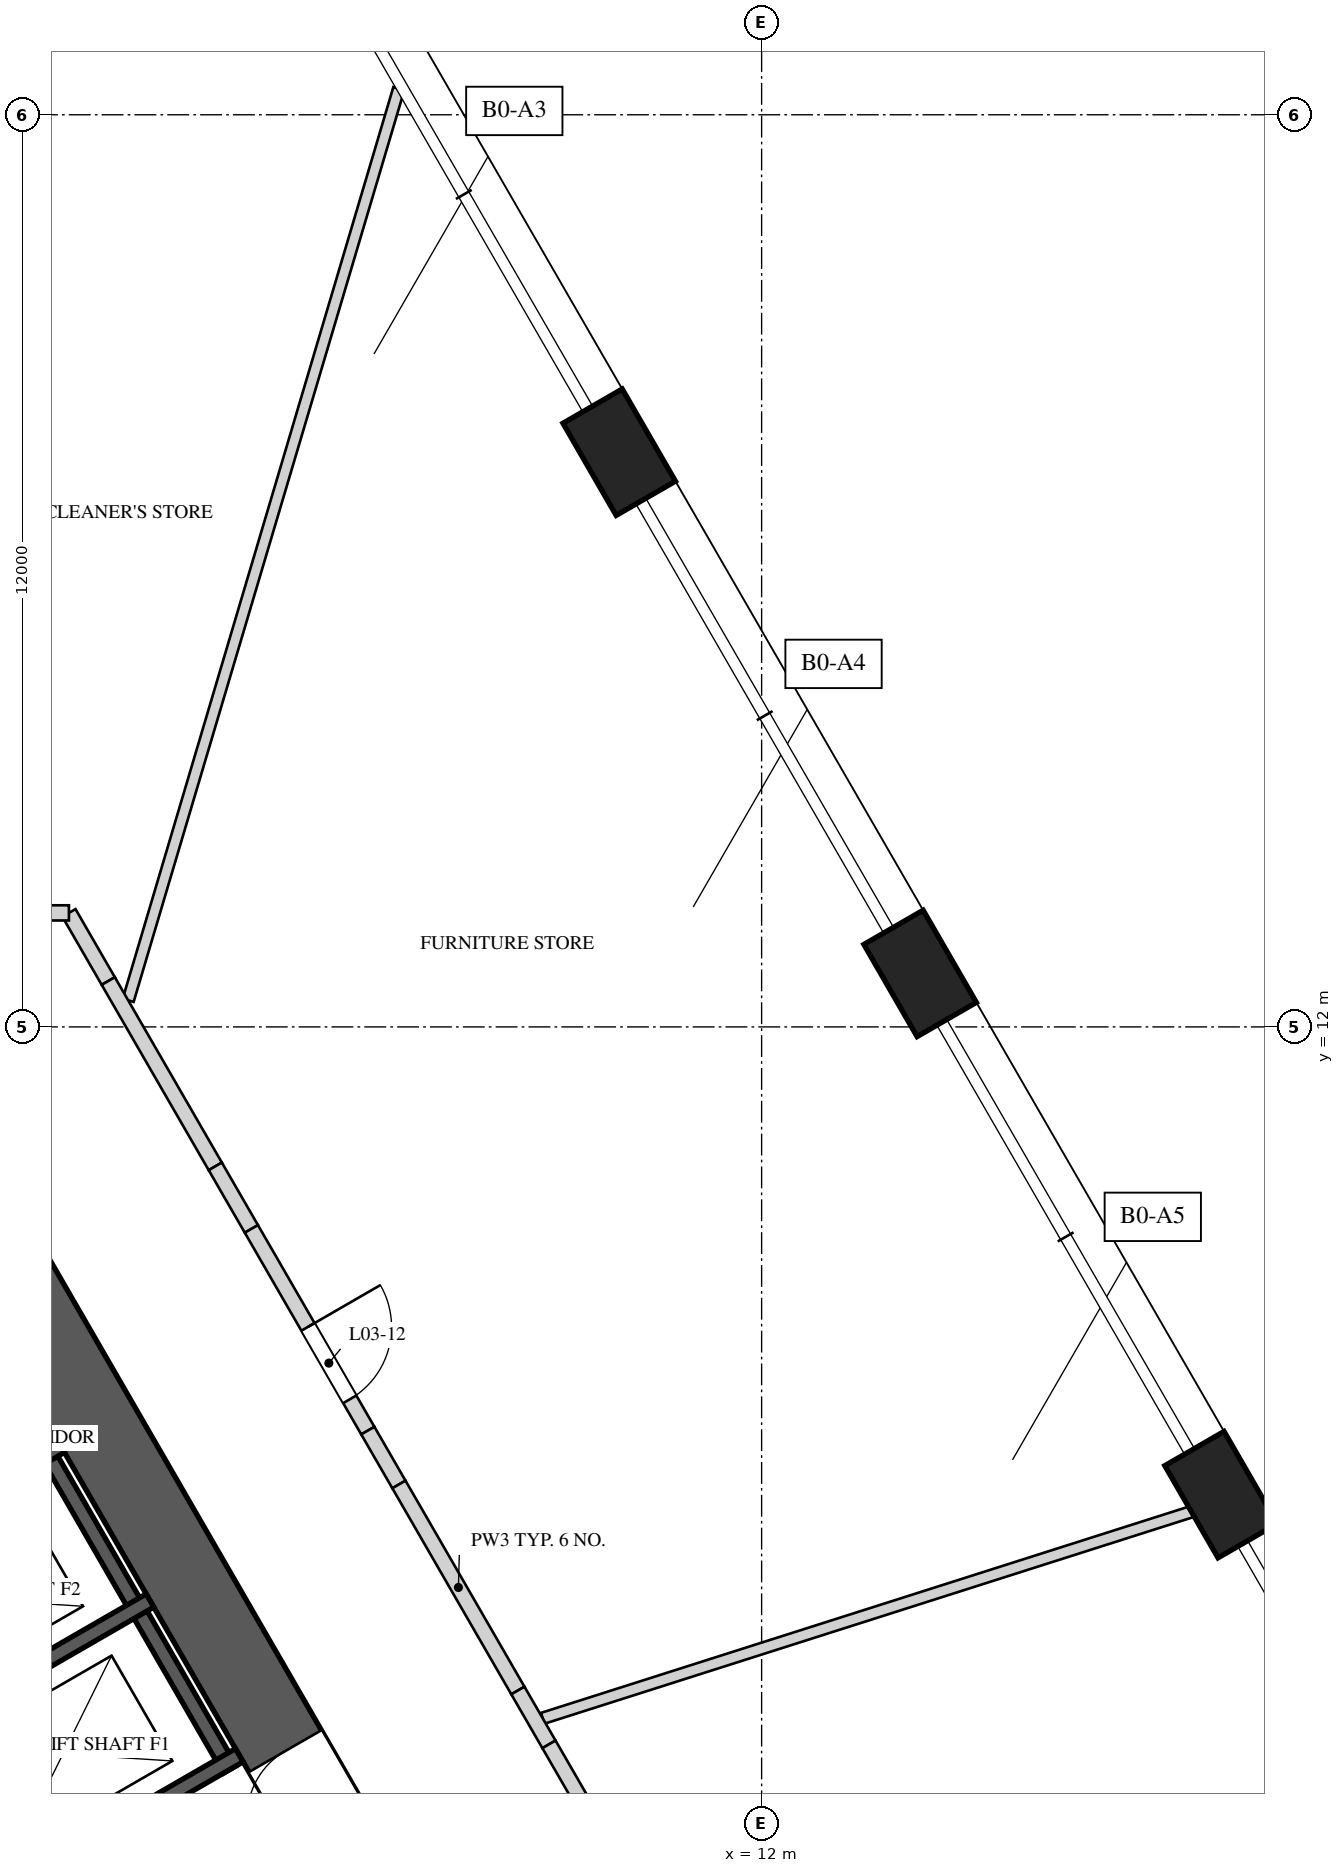
"""IFC4 building model, lengths in metres.
Left out: names, types, materials, properties, quantities, classifications, styles, units other than length and angle.
Written with IfcOpenShell. Run it as: python <this file> out.ifc"""

import sys

from ifc_helpers import new_model, si_unit, direction, frame, frame_2d, origin, origin_2d, place, context, subcontext, project, spatial, polyline, rectangle, outline, extrude, element, fill, save


model = new_model("IFC4")
c1 = context("Model", 3, precision=1e-05, world=origin(), true_north=direction((0.0, 1.0)))
c2 = subcontext(c1, "Body", "Model", "MODEL_VIEW")
j1 = project(units=[si_unit("LENGTHUNIT", "METRE"), si_unit("PLANEANGLEUNIT", "RADIAN")], contexts=[c1])
p1 = place(None, origin())
s1 = spatial("IfcSite", under=j1, at=p1, CompositionType="ELEMENT")
p2 = place(p1, origin())
s2 = spatial("IfcBuilding", under=s1, at=p2, CompositionType="ELEMENT")
p3 = place(p2, frame((0.0, 0.0, 20.0)))
s3 = spatial("IfcBuildingStorey", under=s2, at=p3, CompositionType="ELEMENT", Elevation=20.0)
p4 = place(p3, frame((9.613, -4.25, 0.0), z_axis=(0.0, 0.0, 1.0), x_axis=(-0.500001757713, 0.866024388966, 0.0)))
e1 = element("IfcWall", 1, at=p4, inside=s3, PredefinedType="SHEAR", context=c2, shape_type="SweptSolid", body=[
    extrude(rectangle(XDim=16.974, YDim=1.1, at=frame_2d((8.487, 0.0))), origin(), (0.0, 0.0, 1.0), 5.0),
])
p5 = place(p4, frame((6.762, 0.0, 0.0)))
e2 = element("IfcOpeningElement", 2, at=p5, cuts=e1, PredefinedType="OPENING", context=c2, shape_type="SweptSolid", body=[
    extrude(rectangle(XDim=1.0, YDim=2.4, at=frame_2d((0.5, 1.2))), frame((0.0, 0.56, 0.0), z_axis=(0.0, -1.0, 0.0), x_axis=(1.0, 0.0, 0.0)), (0.0, 0.0, 1.0), 1.12),
])
for number, where, z_axis, x_axis in (
    (3, (18.044, 5.846, 0.0), (0.0, 0.0, 1.0), (-0.5, 0.866, 0.0)),
    (4, (14.085, 12.704, 0.0), (0.0, 0.0, 1.0), (-0.5, 0.866, 0.0)),
    (5, (10.126, 19.561, 0.0), (0.0, 0.0, 1.0), (-0.5, 0.866, 0.0)),
):
    element("IfcColumn", number, at=place(p3, frame(where, z_axis=z_axis, x_axis=x_axis)), inside=s3, PredefinedType="COLUMN", context=c2, shape_type="SweptSolid", body=[
        extrude(rectangle(XDim=1.4, YDim=0.9, at=origin_2d()), origin(), (0.0, 0.0, 1.0), 5.0),
    ])
p6 = place(p3, frame((5.005, 2.231, 0.0), z_axis=(0.0, 0.0, 1.0), x_axis=(-0.500002801628, 0.866023786258, 0.0)))
e6 = element("IfcWall", 6, at=p6, inside=s3, PredefinedType="SOLIDWALL", context=c2, shape_type="SweptSolid", body=[
    extrude(rectangle(XDim=4.9, YDim=0.2, at=frame_2d((2.45, 0.0))), origin(), (0.0, 0.0, 1.0), 4.65),
])
p7 = place(p3, frame((2.227, 0.743, 0.0), z_axis=(0.0, 0.0, 1.0), x_axis=(0.866014461049, 0.500018952895, 0.0)))
e7 = element("IfcWall", 7, at=p7, inside=s3, PredefinedType="SOLIDWALL", context=c2, shape_type="SweptSolid", body=[
    extrude(rectangle(XDim=3.35, YDim=0.2, at=frame_2d((1.675, 0.0))), origin(), (0.0, 0.0, 1.0), 4.65),
])
p8 = place(p3, frame((1.052, 2.778, 0.0), z_axis=(0.0, 0.0, 1.0), x_axis=(0.866032680314, 0.499987396469, 0.0)))
e8 = element("IfcWall", 8, at=p8, inside=s3, PredefinedType="SOLIDWALL", context=c2, shape_type="SweptSolid", body=[
    extrude(rectangle(XDim=3.35, YDim=0.2, at=frame_2d((1.675, 0.0))), origin(), (0.0, 0.0, 1.0), 4.65),
])
p9 = place(p3, frame((-0.123, 4.813, 0.0), z_axis=(0.0, 0.0, 1.0), x_axis=(0.866014461049, 0.500018952895, 0.0)))
e9 = element("IfcWall", 9, at=p9, inside=s3, PredefinedType="SOLIDWALL", context=c2, shape_type="SweptSolid", body=[
    extrude(rectangle(XDim=3.35, YDim=0.2, at=frame_2d((1.675, 0.0))), origin(), (0.0, 0.0, 1.0), 4.65),
])
p10 = place(p3, frame((2.628, 27.737, 0.0), z_axis=(0.0, 0.0, 1.0), x_axis=(-0.094320531398, -0.995541881267, 0.0)))
e10 = element("IfcWall", 10, at=p10, inside=s3, PredefinedType="PARTITIONING", context=c2, shape_type="SweptSolid", body=[
    extrude(rectangle(XDim=8.513, YDim=0.15, at=frame_2d((4.257, 0.0))), origin(), (0.0, 0.0, 1.0), 4.65),
])
p11 = place(p3, frame((3.666, 12.35, 0.0), z_axis=(0.0, 0.0, 1.0), x_axis=(0.284585958586, 0.958650526613, 0.0)))
e11 = element("IfcWall", 11, at=p11, inside=s3, PredefinedType="PARTITIONING", context=c2, shape_type="SweptSolid", body=[
    extrude(rectangle(XDim=12.51, YDim=0.15, at=frame_2d((6.255, 0.0))), origin(), (0.0, 0.0, 1.0), 4.65),
])
p12 = place(p3, frame((9.12, 2.904, 0.0), z_axis=(0.0, 0.0, 1.0), x_axis=(0.952860213553, 0.303409646233, 0.0)))
e12 = element("IfcWall", 12, at=p12, inside=s3, PredefinedType="PARTITIONING", context=c2, shape_type="SweptSolid", body=[
    extrude(rectangle(XDim=9.295, YDim=0.15, at=frame_2d((4.647, 0.0))), origin(), (0.0, 0.0, 1.0), 3.75),
])
p13 = place(p3, frame((2.887, 13.5, 0.0), z_axis=(0.0, 0.0, 1.0), x_axis=(0.499994660107, -0.866028486751, 0.0)))
e13 = element("IfcWall", 13, at=p13, inside=s3, PredefinedType="SOLIDWALL", context=c2, shape_type="SweptSolid", body=[
    extrude(rectangle(XDim=1.035, YDim=0.2, at=frame_2d((0.518, 0.0))), origin(), (0.0, 0.0, 1.0), 3.55),
])
p14 = place(p3, frame((3.404, 12.604, 0.0), z_axis=(0.0, 0.0, 1.0), x_axis=(0.500000186108, -0.866025296335, 0.0)))
e14 = element("IfcWall", 14, at=p14, inside=s3, PredefinedType="SOLIDWALL", context=c2, shape_type="SweptSolid", body=[
    extrude(rectangle(XDim=2.815, YDim=0.2, at=frame_2d((1.408, 0.0))), origin(), (0.0, 0.0, 1.0), 4.65),
])
p15 = place(p3, frame((4.812, 10.165, 0.0), z_axis=(0.0, 0.0, 1.0), x_axis=(0.500174821557, -0.865924446982, 0.0)))
e15 = element("IfcWall", 15, at=p15, inside=s3, PredefinedType="SOLIDWALL", context=c2, shape_type="SweptSolid", body=[
    extrude(rectangle(XDim=0.95, YDim=0.2, at=frame_2d((0.475, 0.0))), origin(), (0.0, 0.0, 1.0), 3.75),
])
p16 = place(p3, frame((5.287, 9.343, 0.0), z_axis=(0.0, 0.0, 1.0), x_axis=(0.499952348839, -0.866052913447, 0.0)))
e16 = element("IfcWall", 16, at=p16, inside=s3, PredefinedType="SOLIDWALL", context=c2, shape_type="SweptSolid", body=[
    extrude(rectangle(XDim=3.064, YDim=0.2, at=frame_2d((1.532, 0.0))), origin(), (0.0, 0.0, 1.0), 4.65),
])
p17 = place(p16, frame((1.489, 0.0, 0.0)))
e17 = element("IfcOpeningElement", 17, at=p17, cuts=e16, PredefinedType="OPENING", context=c2, shape_type="SweptSolid", body=[
    extrude(rectangle(XDim=1.1, YDim=2.4, at=frame_2d((0.55, 1.2))), frame((0.0, 0.11, 0.0), z_axis=(0.0, -1.0, 0.0), x_axis=(1.0, 0.0, 0.0)), (0.0, 0.0, 1.0), 0.22),
])
p18 = place(p3, frame((6.819, 6.689, 0.0), z_axis=(0.0, 0.0, 1.0), x_axis=(0.500118501653, -0.865956976012, 0.0)))
e18 = element("IfcWall", 18, at=p18, inside=s3, PredefinedType="SOLIDWALL", context=c2, shape_type="SweptSolid", body=[
    extrude(rectangle(XDim=0.818, YDim=0.2, at=frame_2d((0.409, 0.0))), origin(), (0.0, 0.0, 1.0), 3.75),
])
p19 = place(p3, frame((7.228, 5.98, 0.0), z_axis=(0.0, 0.0, 1.0), x_axis=(0.499947505232, -0.866055709532, 0.0)))
e19 = element("IfcWall", 19, at=p19, inside=s3, PredefinedType="SOLIDWALL", context=c2, shape_type="SweptSolid", body=[
    extrude(rectangle(XDim=3.13, YDim=0.2, at=frame_2d((1.565, 0.0))), origin(), (0.0, 0.0, 1.0), 4.65),
])
p20 = place(p3, frame((8.793, 3.27, 0.0), z_axis=(0.0, 0.0, 1.0), x_axis=(0.500118501653, -0.865956976012, 0.0)))
e20 = element("IfcWall", 20, at=p20, inside=s3, PredefinedType="SOLIDWALL", context=c2, shape_type="SweptSolid", body=[
    extrude(rectangle(XDim=0.818, YDim=0.2, at=frame_2d((0.409, 0.0))), origin(), (0.0, 0.0, 1.0), 3.75),
])
p21 = place(p3, frame((9.202, 2.561, 0.0), z_axis=(0.0, 0.0, 1.0), x_axis=(0.499952348839, -0.866052913447, 0.0)))
e21 = element("IfcWall", 21, at=p21, inside=s3, PredefinedType="SOLIDWALL", context=c2, shape_type="SweptSolid", body=[
    extrude(rectangle(XDim=3.064, YDim=0.2, at=frame_2d((1.532, 0.0))), origin(), (0.0, 0.0, 1.0), 4.65),
])
p22 = place(p21, frame((1.839, 0.0, 0.0)))
e22 = element("IfcOpeningElement", 22, at=p22, cuts=e21, PredefinedType="OPENING", context=c2, shape_type="SweptSolid", body=[
    extrude(rectangle(XDim=1.1, YDim=2.4, at=frame_2d((0.55, 1.2))), frame((0.0, 0.11, 0.0), z_axis=(0.0, -1.0, 0.0), x_axis=(1.0, 0.0, 0.0)), (0.0, 0.0, 1.0), 0.22),
])
p23 = place(p3, frame((0.52, 13.5, 0.0), z_axis=(0.0, 0.0, 1.0), x_axis=(1.0, 0.0, 0.0)))
e23 = element("IfcWall", 23, at=p23, inside=s3, PredefinedType="SOLIDWALL", context=c2, shape_type="SweptSolid", body=[
    extrude(outline(polyline([(0.0, 0.0), (2.366, 0.0), (2.366, 3.55), (2.169, 3.55), (2.169, 4.65), (0.902, 4.65), (0.902, 3.55), (0.0, 3.55), (0.0, 0.0)])), frame((0.0, 0.1, 0.0), z_axis=(0.0, -1.0, 0.0), x_axis=(1.0, 0.0, 0.0)), (0.0, 0.0, 1.0), 0.2),
])
p24 = place(p23, frame((0.936, 0.0, 0.0)))
e24 = element("IfcOpeningElement", 24, at=p24, cuts=e23, PredefinedType="OPENING", context=c2, shape_type="SweptSolid", body=[
    extrude(rectangle(XDim=1.1, YDim=2.4, at=frame_2d((0.55, 1.2))), frame((0.0, 0.11, 0.0), z_axis=(0.0, -1.0, 0.0), x_axis=(1.0, 0.0, 0.0)), (0.0, 0.0, 1.0), 0.22),
])
p25 = place(p5, origin())
e25 = element("IfcDoor", 25, at=p25, inside=s3, OperationType="SINGLE_SWING_LEFT", PredefinedType="DOOR", context=c2, shape_type="SweptSolid", body=[
    extrude(rectangle(XDim=1.0, YDim=2.4, at=frame_2d((0.5, 1.2))), frame((0.0, 0.025, 0.0), z_axis=(0.0, -1.0, 0.0), x_axis=(1.0, 0.0, 0.0)), (0.0, 0.0, 1.0), 0.05),
])
fill(e2, e25)
p26 = place(p17, origin())
e26 = element("IfcDoor", 26, at=p26, inside=s3, OperationType="SINGLE_SWING_RIGHT", PredefinedType="DOOR", context=c2, shape_type="SweptSolid", body=[
    extrude(rectangle(XDim=1.1, YDim=2.4, at=frame_2d((0.55, 1.2))), frame((0.0, 0.025, 0.0), z_axis=(0.0, -1.0, 0.0), x_axis=(1.0, 0.0, 0.0)), (0.0, 0.0, 1.0), 0.05),
])
fill(e17, e26)
save(model, sys.argv[1])
